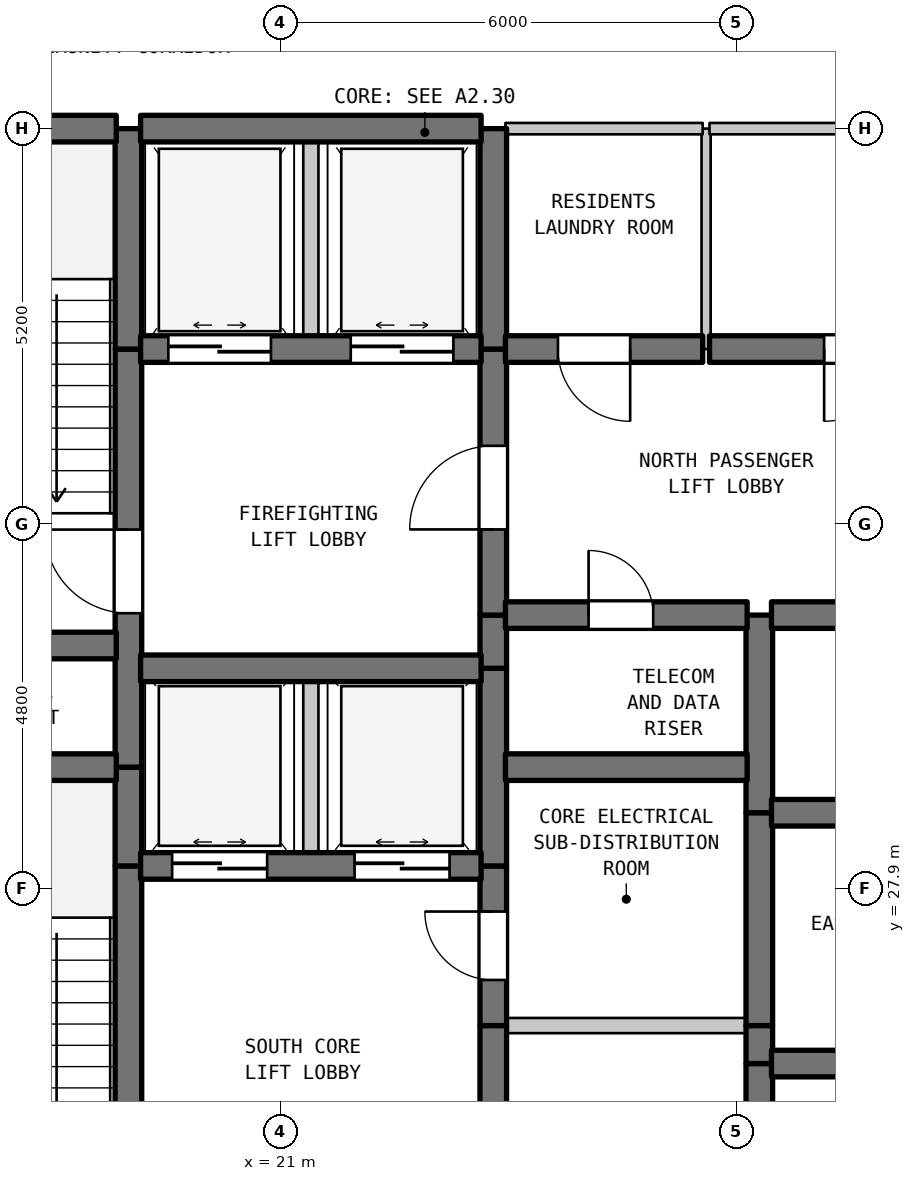
"""IFC4 building model, lengths in metres.
Left out: names, types, materials, properties, quantities, classifications, styles, units other than length and angle.
Written with IfcOpenShell. Run it as: python <this file> out.ifc"""

import sys

from ifc_helpers import new_model, si_unit, direction, frame, frame_2d, origin, place, context, subcontext, project, spatial, rectangle, extrude, element, fill, save


model = new_model("IFC4")
c1 = context("Model", 3, precision=1e-05, world=origin(), true_north=direction((0.0, 1.0)))
c2 = subcontext(c1, "Body", "Model", "MODEL_VIEW")
j1 = project(units=[si_unit("LENGTHUNIT", "METRE"), si_unit("PLANEANGLEUNIT", "RADIAN")], contexts=[c1])
p1 = place(None, origin())
s1 = spatial("IfcSite", under=j1, at=p1, CompositionType="ELEMENT")
p2 = place(p1, origin())
s2 = spatial("IfcBuilding", under=s1, at=p2, CompositionType="ELEMENT")
p3 = place(p2, frame((0.0, 0.0, 299.1)))
s3 = spatial("IfcBuildingStorey", under=s2, at=p3, CompositionType="ELEMENT", Elevation=299.1)
p4 = place(p3, frame((19.0, 22.7, 0.0), z_axis=(0.0, 0.0, 1.0), x_axis=(0.0, 1.0, 0.0)))
e1 = element("IfcWall", 1, at=p4, inside=s3, PredefinedType="SHEAR", context=c2, shape_type="SweptSolid", body=[
    extrude(rectangle(XDim=5.5, YDim=0.35, at=frame_2d((2.75, 0.0))), origin(), (0.0, 0.0, 1.0), 4.19),
])
p5 = place(p4, frame((0.631, 0.0, 0.0)))
e2 = element("IfcOpeningElement", 2, at=p5, cuts=e1, PredefinedType="OPENING", context=c2, shape_type="SweptSolid", body=[
    extrude(rectangle(XDim=1.1, YDim=2.15, at=frame_2d((0.55, 1.075))), frame((0.0, 0.185, 0.0), z_axis=(0.0, -1.0, 0.0), x_axis=(1.0, 0.0, 0.0)), (0.0, 0.0, 1.0), 0.37),
])
p6 = place(p3, frame((19.0, 28.2, 0.0), z_axis=(0.0, 0.0, 1.0), x_axis=(0.0, 1.0, 0.0)))
e3 = element("IfcWall", 3, at=p6, inside=s3, PredefinedType="SHEAR", context=c2, shape_type="SweptSolid", body=[
    extrude(rectangle(XDim=1.3, YDim=0.35, at=frame_2d((0.65, 0.0))), origin(), (0.0, 0.0, 1.0), 4.19),
])
p7 = place(p3, frame((19.0, 29.5, 0.0), z_axis=(0.0, 0.0, 1.0), x_axis=(0.0, 1.0, 0.0)))
e4 = element("IfcWall", 4, at=p7, inside=s3, PredefinedType="SHEAR", context=c2, shape_type="SweptSolid", body=[
    extrude(rectangle(XDim=5.5, YDim=0.35, at=frame_2d((2.75, 0.0))), origin(), (0.0, 0.0, 1.0), 4.19),
])
p8 = place(p7, frame((2.025, 0.0, 0.0)))
e5 = element("IfcOpeningElement", 5, at=p8, cuts=e4, PredefinedType="OPENING", context=c2, shape_type="SweptSolid", body=[
    extrude(rectangle(XDim=1.1, YDim=2.15, at=frame_2d((0.55, 1.075))), frame((0.0, 0.185, 0.0), z_axis=(0.0, -1.0, 0.0), x_axis=(1.0, 0.0, 0.0)), (0.0, 0.0, 1.0), 0.37),
])
p9 = place(p3, frame((19.0, 35.0, 0.0), z_axis=(0.0, 0.0, 1.0), x_axis=(0.0, 1.0, 0.0)))
e6 = element("IfcWall", 6, at=p9, inside=s3, PredefinedType="SHEAR", context=c2, shape_type="SweptSolid", body=[
    extrude(rectangle(XDim=2.9, YDim=0.35, at=frame_2d((1.45, 0.0))), origin(), (0.0, 0.0, 1.0), 4.19),
])
p10 = place(p3, frame((21.4, 28.2, 0.0), z_axis=(0.0, 0.0, 1.0), x_axis=(0.0, 1.0, 0.0)))
e7 = element("IfcWall", 7, at=p10, inside=s3, PredefinedType="STANDARD", context=c2, shape_type="SweptSolid", body=[
    extrude(rectangle(XDim=2.6, YDim=0.2, at=frame_2d((1.3, 0.0))), origin(), (0.0, 0.0, 1.0), 4.19),
])
p11 = place(p3, frame((21.4, 35.0, 0.0), z_axis=(0.0, 0.0, 1.0), x_axis=(0.0, 1.0, 0.0)))
e8 = element("IfcWall", 8, at=p11, inside=s3, PredefinedType="STANDARD", context=c2, shape_type="SweptSolid", body=[
    extrude(rectangle(XDim=2.9, YDim=0.2, at=frame_2d((1.45, 0.0))), origin(), (0.0, 0.0, 1.0), 4.19),
])
p12 = place(p3, frame((23.8, 22.7, 0.0), z_axis=(0.0, 0.0, 1.0), x_axis=(0.0, 1.0, 0.0)))
e9 = element("IfcWall", 9, at=p12, inside=s3, PredefinedType="SHEAR", context=c2, shape_type="SweptSolid", body=[
    extrude(rectangle(XDim=3.4, YDim=0.35, at=frame_2d((1.7, 0.0))), origin(), (0.0, 0.0, 1.0), 4.19),
])
p13 = place(p12, frame((1.25, 0.0, 0.0)))
e10 = element("IfcOpeningElement", 10, at=p13, cuts=e9, PredefinedType="OPENING", context=c2, shape_type="SweptSolid", body=[
    extrude(rectangle(XDim=0.9, YDim=2.15, at=frame_2d((0.45, 1.075))), frame((0.0, 0.185, 0.0), z_axis=(0.0, -1.0, 0.0), x_axis=(1.0, 0.0, 0.0)), (0.0, 0.0, 1.0), 0.37),
])
p14 = place(p3, frame((23.8, 26.1, 0.0), z_axis=(0.0, 0.0, 1.0), x_axis=(0.0, 1.0, 0.0)))
e11 = element("IfcWall", 11, at=p14, inside=s3, PredefinedType="SHEAR", context=c2, shape_type="SweptSolid", body=[
    extrude(rectangle(XDim=2.1, YDim=0.35, at=frame_2d((1.05, 0.0))), origin(), (0.0, 0.0, 1.0), 4.19),
])
p15 = place(p14, frame((0.6, 0.0, 0.0)))
e12 = element("IfcOpeningElement", 12, at=p15, cuts=e11, PredefinedType="OPENING", context=c2, shape_type="SweptSolid", body=[
    extrude(rectangle(XDim=0.9, YDim=2.15, at=frame_2d((0.45, 1.075))), frame((0.0, 0.185, 0.0), z_axis=(0.0, -1.0, 0.0), x_axis=(1.0, 0.0, 0.0)), (0.0, 0.0, 1.0), 0.37),
])
p16 = place(p3, frame((23.8, 28.2, 0.0), z_axis=(0.0, 0.0, 1.0), x_axis=(0.0, 1.0, 0.0)))
e13 = element("IfcWall", 13, at=p16, inside=s3, PredefinedType="SHEAR", context=c2, shape_type="SweptSolid", body=[
    extrude(rectangle(XDim=2.6, YDim=0.35, at=frame_2d((1.3, 0.0))), origin(), (0.0, 0.0, 1.0), 4.19),
])
p17 = place(p3, frame((23.8, 30.8, 0.0), z_axis=(0.0, 0.0, 1.0), x_axis=(0.0, 1.0, 0.0)))
e14 = element("IfcWall", 14, at=p17, inside=s3, PredefinedType="SHEAR", context=c2, shape_type="SweptSolid", body=[
    extrude(rectangle(XDim=0.7, YDim=0.35, at=frame_2d((0.35, 0.0))), origin(), (0.0, 0.0, 1.0), 4.19),
])
p18 = place(p3, frame((23.8, 31.5, 0.0), z_axis=(0.0, 0.0, 1.0), x_axis=(0.0, 1.0, 0.0)))
e15 = element("IfcWall", 15, at=p18, inside=s3, PredefinedType="SHEAR", context=c2, shape_type="SweptSolid", body=[
    extrude(rectangle(XDim=3.5, YDim=0.35, at=frame_2d((1.75, 0.0))), origin(), (0.0, 0.0, 1.0), 4.19),
])
p19 = place(p18, frame((1.127, 0.0, 0.0)))
e16 = element("IfcOpeningElement", 16, at=p19, cuts=e15, PredefinedType="OPENING", context=c2, shape_type="SweptSolid", body=[
    extrude(rectangle(XDim=1.1, YDim=2.15, at=frame_2d((0.55, 1.075))), frame((0.0, 0.185, 0.0), z_axis=(0.0, -1.0, 0.0), x_axis=(1.0, 0.0, 0.0)), (0.0, 0.0, 1.0), 0.37),
])
p20 = place(p3, frame((23.8, 35.0, 0.0), z_axis=(0.0, 0.0, 1.0), x_axis=(0.0, 1.0, 0.0)))
e17 = element("IfcWall", 17, at=p20, inside=s3, PredefinedType="SHEAR", context=c2, shape_type="SweptSolid", body=[
    extrude(rectangle(XDim=2.9, YDim=0.35, at=frame_2d((1.45, 0.0))), origin(), (0.0, 0.0, 1.0), 4.19),
])
p21 = place(p3, frame((26.6, 35.0, 0.0), z_axis=(0.0, 0.0, 1.0), x_axis=(0.0, 1.0, 0.0)))
e18 = element("IfcWall", 18, at=p21, inside=s3, PredefinedType="PARTITIONING", context=c2, shape_type="SweptSolid", body=[
    extrude(rectangle(XDim=2.9, YDim=0.12, at=frame_2d((1.45, 0.0))), origin(), (0.0, 0.0, 1.0), 4.19),
])
p22 = place(p3, frame((27.3, 22.7, 0.0), z_axis=(0.0, 0.0, 1.0), x_axis=(0.0, 1.0, 0.0)))
e19 = element("IfcWall", 19, at=p22, inside=s3, PredefinedType="SHEAR", context=c2, shape_type="SweptSolid", body=[
    extrude(rectangle(XDim=2.9, YDim=0.35, at=frame_2d((1.45, 0.0))), origin(), (0.0, 0.0, 1.0), 4.19),
])
p23 = place(p3, frame((27.3, 25.6, 0.0), z_axis=(0.0, 0.0, 1.0), x_axis=(0.0, 1.0, 0.0)))
e20 = element("IfcWall", 20, at=p23, inside=s3, PredefinedType="SHEAR", context=c2, shape_type="SweptSolid", body=[
    extrude(rectangle(XDim=0.5, YDim=0.35, at=frame_2d((0.25, 0.0))), origin(), (0.0, 0.0, 1.0), 4.19),
])
p24 = place(p3, frame((27.3, 26.1, 0.0), z_axis=(0.0, 0.0, 1.0), x_axis=(0.0, 1.0, 0.0)))
e21 = element("IfcWall", 21, at=p24, inside=s3, PredefinedType="SHEAR", context=c2, shape_type="SweptSolid", body=[
    extrude(rectangle(XDim=2.8, YDim=0.35, at=frame_2d((1.4, 0.0))), origin(), (0.0, 0.0, 1.0), 4.19),
])
p25 = place(p3, frame((27.3, 28.9, 0.0), z_axis=(0.0, 0.0, 1.0), x_axis=(0.0, 1.0, 0.0)))
e22 = element("IfcWall", 22, at=p25, inside=s3, PredefinedType="SHEAR", context=c2, shape_type="SweptSolid", body=[
    extrude(rectangle(XDim=2.6, YDim=0.35, at=frame_2d((1.3, 0.0))), origin(), (0.0, 0.0, 1.0), 4.19),
])
p26 = place(p3, frame((27.46, 25.6, 0.0), z_axis=(0.0, 0.0, 1.0), x_axis=(1.0, 0.0, 0.0)))
e23 = element("IfcWall", 23, at=p26, inside=s3, PredefinedType="SHEAR", context=c2, shape_type="SweptSolid", body=[
    extrude(rectangle(XDim=3.18, YDim=0.35, at=frame_2d((1.59, 0.0))), origin(), (0.0, 0.0, 1.0), 4.19),
])
p27 = place(p26, frame((1.115, 0.0, 0.0)))
e24 = element("IfcOpeningElement", 24, at=p27, cuts=e23, PredefinedType="OPENING", context=c2, shape_type="SweptSolid", body=[
    extrude(rectangle(XDim=0.95, YDim=2.15, at=frame_2d((0.475, 1.075))), frame((0.0, 0.185, 0.0), z_axis=(0.0, -1.0, 0.0), x_axis=(1.0, 0.0, 0.0)), (0.0, 0.0, 1.0), 0.37),
])
p28 = place(p3, frame((23.96, 26.1, 0.0), z_axis=(0.0, 0.0, 1.0), x_axis=(1.0, 0.0, 0.0)))
e25 = element("IfcWall", 25, at=p28, inside=s3, PredefinedType="STANDARD", context=c2, shape_type="SweptSolid", body=[
    extrude(rectangle(XDim=3.18, YDim=0.2, at=frame_2d((1.59, 0.0))), origin(), (0.0, 0.0, 1.0), 4.19),
])
p29 = place(p3, frame((19.16, 28.2, 0.0), z_axis=(0.0, 0.0, 1.0), x_axis=(1.0, 0.0, 0.0)))
e26 = element("IfcWall", 26, at=p29, inside=s3, PredefinedType="SHEAR", context=c2, shape_type="SweptSolid", body=[
    extrude(rectangle(XDim=4.48, YDim=0.35, at=frame_2d((2.24, 0.0))), origin(), (0.0, 0.0, 1.0), 4.19),
])
p30 = place(p29, frame((0.415, 0.0, 0.0)))
e27 = element("IfcOpeningElement", 27, at=p30, cuts=e26, PredefinedType="OPENING", context=c2, shape_type="SweptSolid", body=[
    extrude(rectangle(XDim=1.25, YDim=2.2, at=frame_2d((0.625, 1.1))), frame((0.0, 0.185, 0.0), z_axis=(0.0, -1.0, 0.0), x_axis=(1.0, 0.0, 0.0)), (0.0, 0.0, 1.0), 0.37),
])
p31 = place(p29, frame((2.815, 0.0, 0.0)))
e28 = element("IfcOpeningElement", 28, at=p31, cuts=e26, PredefinedType="OPENING", context=c2, shape_type="SweptSolid", body=[
    extrude(rectangle(XDim=1.25, YDim=2.2, at=frame_2d((0.625, 1.1))), frame((0.0, 0.185, 0.0), z_axis=(0.0, -1.0, 0.0), x_axis=(1.0, 0.0, 0.0)), (0.0, 0.0, 1.0), 0.37),
])
p32 = place(p3, frame((27.46, 28.9, 0.0), z_axis=(0.0, 0.0, 1.0), x_axis=(1.0, 0.0, 0.0)))
e29 = element("IfcWall", 29, at=p32, inside=s3, PredefinedType="SHEAR", context=c2, shape_type="SweptSolid", body=[
    extrude(rectangle(XDim=3.18, YDim=0.35, at=frame_2d((1.59, 0.0))), origin(), (0.0, 0.0, 1.0), 4.19),
])
p33 = place(p32, frame((1.115, 0.0, 0.0)))
e30 = element("IfcOpeningElement", 30, at=p33, cuts=e29, PredefinedType="OPENING", context=c2, shape_type="SweptSolid", body=[
    extrude(rectangle(XDim=0.95, YDim=2.15, at=frame_2d((0.475, 1.075))), frame((0.0, 0.185, 0.0), z_axis=(0.0, -1.0, 0.0), x_axis=(1.0, 0.0, 0.0)), (0.0, 0.0, 1.0), 0.37),
])
p34 = place(p3, frame((15.16, 29.5, 0.0), z_axis=(0.0, 0.0, 1.0), x_axis=(1.0, 0.0, 0.0)))
e31 = element("IfcWall", 31, at=p34, inside=s3, PredefinedType="SHEAR", context=c2, shape_type="SweptSolid", body=[
    extrude(rectangle(XDim=3.68, YDim=0.35, at=frame_2d((1.84, 0.0))), origin(), (0.0, 0.0, 1.0), 4.19),
])
p35 = place(p3, frame((23.96, 29.5, 0.0), z_axis=(0.0, 0.0, 1.0), x_axis=(1.0, 0.0, 0.0)))
e32 = element("IfcWall", 32, at=p35, inside=s3, PredefinedType="SHEAR", context=c2, shape_type="SweptSolid", body=[
    extrude(rectangle(XDim=3.18, YDim=0.35, at=frame_2d((1.59, 0.0))), origin(), (0.0, 0.0, 1.0), 4.19),
])
p36 = place(p3, frame((19.16, 30.8, 0.0), z_axis=(0.0, 0.0, 1.0), x_axis=(1.0, 0.0, 0.0)))
e33 = element("IfcWall", 33, at=p36, inside=s3, PredefinedType="SHEAR", context=c2, shape_type="SweptSolid", body=[
    extrude(rectangle(XDim=4.48, YDim=0.35, at=frame_2d((2.24, 0.0))), origin(), (0.0, 0.0, 1.0), 4.19),
])
p37 = place(p3, frame((15.16, 31.1, 0.0), z_axis=(0.0, 0.0, 1.0), x_axis=(1.0, 0.0, 0.0)))
e34 = element("IfcWall", 34, at=p37, inside=s3, PredefinedType="SHEAR", context=c2, shape_type="SweptSolid", body=[
    extrude(rectangle(XDim=3.68, YDim=0.35, at=frame_2d((1.84, 0.0))), origin(), (0.0, 0.0, 1.0), 4.19),
])
p38 = place(p3, frame((23.96, 31.5, 0.0), z_axis=(0.0, 0.0, 1.0), x_axis=(1.0, 0.0, 0.0)))
e35 = element("IfcWall", 35, at=p38, inside=s3, PredefinedType="SHEAR", context=c2, shape_type="SweptSolid", body=[
    extrude(rectangle(XDim=3.18, YDim=0.35, at=frame_2d((1.59, 0.0))), origin(), (0.0, 0.0, 1.0), 4.19),
])
p39 = place(p38, frame((1.094, 0.0, 0.0)))
e36 = element("IfcOpeningElement", 36, at=p39, cuts=e35, PredefinedType="OPENING", context=c2, shape_type="SweptSolid", body=[
    extrude(rectangle(XDim=0.85, YDim=2.1, at=frame_2d((0.425, 1.05))), frame((0.0, 0.185, 0.0), z_axis=(0.0, -1.0, 0.0), x_axis=(1.0, 0.0, 0.0)), (0.0, 0.0, 1.0), 0.37),
])
p40 = place(p3, frame((27.46, 31.5, 0.0), z_axis=(0.0, 0.0, 1.0), x_axis=(1.0, 0.0, 0.0)))
e37 = element("IfcWall", 37, at=p40, inside=s3, PredefinedType="SHEAR", context=c2, shape_type="SweptSolid", body=[
    extrude(rectangle(XDim=3.18, YDim=0.35, at=frame_2d((1.59, 0.0))), origin(), (0.0, 0.0, 1.0), 4.19),
])
p41 = place(p3, frame((19.16, 35.0, 0.0), z_axis=(0.0, 0.0, 1.0), x_axis=(1.0, 0.0, 0.0)))
e38 = element("IfcWall", 38, at=p41, inside=s3, PredefinedType="SHEAR", context=c2, shape_type="SweptSolid", body=[
    extrude(rectangle(XDim=4.48, YDim=0.35, at=frame_2d((2.24, 0.0))), origin(), (0.0, 0.0, 1.0), 4.19),
])
p42 = place(p41, frame((0.365, 0.0, 0.0)))
e39 = element("IfcOpeningElement", 39, at=p42, cuts=e38, PredefinedType="OPENING", context=c2, shape_type="SweptSolid", body=[
    extrude(rectangle(XDim=1.35, YDim=2.2, at=frame_2d((0.675, 1.1))), frame((0.0, 0.185, 0.0), z_axis=(0.0, -1.0, 0.0), x_axis=(1.0, 0.0, 0.0)), (0.0, 0.0, 1.0), 0.37),
])
p43 = place(p41, frame((2.765, 0.0, 0.0)))
e40 = element("IfcOpeningElement", 40, at=p43, cuts=e38, PredefinedType="OPENING", context=c2, shape_type="SweptSolid", body=[
    extrude(rectangle(XDim=1.35, YDim=2.2, at=frame_2d((0.675, 1.1))), frame((0.0, 0.185, 0.0), z_axis=(0.0, -1.0, 0.0), x_axis=(1.0, 0.0, 0.0)), (0.0, 0.0, 1.0), 0.37),
])
p44 = place(p3, frame((23.96, 35.0, 0.0), z_axis=(0.0, 0.0, 1.0), x_axis=(1.0, 0.0, 0.0)))
e41 = element("IfcWall", 41, at=p44, inside=s3, PredefinedType="SHEAR", context=c2, shape_type="SweptSolid", body=[
    extrude(rectangle(XDim=2.595, YDim=0.35, at=frame_2d((1.297, 0.0))), origin(), (0.0, 0.0, 1.0), 4.19),
])
p45 = place(p44, frame((0.691, 0.0, 0.0)))
e42 = element("IfcOpeningElement", 42, at=p45, cuts=e41, PredefinedType="OPENING", context=c2, shape_type="SweptSolid", body=[
    extrude(rectangle(XDim=0.95, YDim=2.15, at=frame_2d((0.475, 1.075))), frame((0.0, 0.185, 0.0), z_axis=(0.0, -1.0, 0.0), x_axis=(1.0, 0.0, 0.0)), (0.0, 0.0, 1.0), 0.37),
])
p46 = place(p3, frame((26.645, 35.0, 0.0), z_axis=(0.0, 0.0, 1.0), x_axis=(1.0, 0.0, 0.0)))
e43 = element("IfcWall", 43, at=p46, inside=s3, PredefinedType="SHEAR", context=c2, shape_type="SweptSolid", body=[
    extrude(rectangle(XDim=3.995, YDim=0.35, at=frame_2d((1.998, 0.0))), origin(), (0.0, 0.0, 1.0), 4.19),
])
p47 = place(p46, frame((1.508, 0.0, 0.0)))
e44 = element("IfcOpeningElement", 44, at=p47, cuts=e43, PredefinedType="OPENING", context=c2, shape_type="SweptSolid", body=[
    extrude(rectangle(XDim=0.95, YDim=2.15, at=frame_2d((0.475, 1.075))), frame((0.0, 0.185, 0.0), z_axis=(0.0, -1.0, 0.0), x_axis=(1.0, 0.0, 0.0)), (0.0, 0.0, 1.0), 0.37),
])
p48 = place(p3, frame((15.16, 37.9, 0.0), z_axis=(0.0, 0.0, 1.0), x_axis=(1.0, 0.0, 0.0)))
e45 = element("IfcWall", 45, at=p48, inside=s3, PredefinedType="SHEAR", context=c2, shape_type="SweptSolid", body=[
    extrude(rectangle(XDim=3.68, YDim=0.35, at=frame_2d((1.84, 0.0))), origin(), (0.0, 0.0, 1.0), 4.19),
])
p49 = place(p3, frame((19.16, 37.9, 0.0), z_axis=(0.0, 0.0, 1.0), x_axis=(1.0, 0.0, 0.0)))
e46 = element("IfcWall", 46, at=p49, inside=s3, PredefinedType="SHEAR", context=c2, shape_type="SweptSolid", body=[
    extrude(rectangle(XDim=4.48, YDim=0.35, at=frame_2d((2.24, 0.0))), origin(), (0.0, 0.0, 1.0), 4.19),
])
p50 = place(p3, frame((23.96, 37.9, 0.0), z_axis=(0.0, 0.0, 1.0), x_axis=(1.0, 0.0, 0.0)))
e47 = element("IfcWall", 47, at=p50, inside=s3, PredefinedType="STANDARD", context=c2, shape_type="SweptSolid", body=[
    extrude(rectangle(XDim=2.595, YDim=0.15, at=frame_2d((1.297, 0.0))), origin(), (0.0, 0.0, 1.0), 3.69),
])
p51 = place(p3, frame((26.645, 37.9, 0.0), z_axis=(0.0, 0.0, 1.0), x_axis=(1.0, 0.0, 0.0)))
e48 = element("IfcWall", 48, at=p51, inside=s3, PredefinedType="STANDARD", context=c2, shape_type="SweptSolid", body=[
    extrude(rectangle(XDim=4.095, YDim=0.15, at=frame_2d((2.047, 0.0))), origin(), (0.0, 0.0, 1.0), 3.69),
])
p52 = place(p8, origin())
e49 = element("IfcDoor", 49, at=p52, inside=s3, OperationType="SINGLE_SWING_RIGHT", PredefinedType="DOOR", context=c2, shape_type="SweptSolid", body=[
    extrude(rectangle(XDim=1.1, YDim=2.15, at=frame_2d((0.55, 1.075))), frame((0.0, 0.025, 0.0), z_axis=(0.0, -1.0, 0.0), x_axis=(1.0, 0.0, 0.0)), (0.0, 0.0, 1.0), 0.05),
])
fill(e5, e49)
p53 = place(p15, origin())
e50 = element("IfcDoor", 50, at=p53, inside=s3, OperationType="SINGLE_SWING_RIGHT", PredefinedType="DOOR", context=c2, shape_type="SweptSolid", body=[
    extrude(rectangle(XDim=0.9, YDim=2.15, at=frame_2d((0.45, 1.075))), frame((0.0, 0.025, 0.0), z_axis=(0.0, -1.0, 0.0), x_axis=(1.0, 0.0, 0.0)), (0.0, 0.0, 1.0), 0.05),
])
fill(e12, e50)
p54 = place(p19, origin())
e51 = element("IfcDoor", 51, at=p54, inside=s3, OperationType="SINGLE_SWING_LEFT", PredefinedType="DOOR", context=c2, shape_type="SweptSolid", body=[
    extrude(rectangle(XDim=1.1, YDim=2.15, at=frame_2d((0.55, 1.075))), frame((0.0, 0.025, 0.0), z_axis=(0.0, -1.0, 0.0), x_axis=(1.0, 0.0, 0.0)), (0.0, 0.0, 1.0), 0.05),
])
fill(e16, e51)
p55 = place(p30, origin())
e52 = element("IfcDoor", 52, at=p55, inside=s3, OperationType="DOUBLE_DOOR_SLIDING", PredefinedType="DOOR", context=c2, shape_type="SweptSolid", body=[
    extrude(rectangle(XDim=1.25, YDim=2.2, at=frame_2d((0.625, 1.1))), frame((0.0, 0.025, 0.0), z_axis=(0.0, -1.0, 0.0), x_axis=(1.0, 0.0, 0.0)), (0.0, 0.0, 1.0), 0.05),
])
fill(e27, e52)
p56 = place(p31, origin())
e53 = element("IfcDoor", 53, at=p56, inside=s3, OperationType="DOUBLE_DOOR_SLIDING", PredefinedType="DOOR", context=c2, shape_type="SweptSolid", body=[
    extrude(rectangle(XDim=1.25, YDim=2.2, at=frame_2d((0.625, 1.1))), frame((0.0, 0.025, 0.0), z_axis=(0.0, -1.0, 0.0), x_axis=(1.0, 0.0, 0.0)), (0.0, 0.0, 1.0), 0.05),
])
fill(e28, e53)
p57 = place(p39, origin())
e54 = element("IfcDoor", 54, at=p57, inside=s3, OperationType="SINGLE_SWING_LEFT", PredefinedType="DOOR", context=c2, shape_type="SweptSolid", body=[
    extrude(rectangle(XDim=0.85, YDim=2.1, at=frame_2d((0.425, 1.05))), frame((0.0, 0.025, 0.0), z_axis=(0.0, -1.0, 0.0), x_axis=(1.0, 0.0, 0.0)), (0.0, 0.0, 1.0), 0.05),
])
fill(e36, e54)
p58 = place(p42, origin())
e55 = element("IfcDoor", 55, at=p58, inside=s3, OperationType="DOUBLE_DOOR_SLIDING", PredefinedType="DOOR", context=c2, shape_type="SweptSolid", body=[
    extrude(rectangle(XDim=1.35, YDim=2.2, at=frame_2d((0.675, 1.1))), frame((0.0, 0.025, 0.0), z_axis=(0.0, -1.0, 0.0), x_axis=(1.0, 0.0, 0.0)), (0.0, 0.0, 1.0), 0.05),
])
fill(e39, e55)
p59 = place(p43, origin())
e56 = element("IfcDoor", 56, at=p59, inside=s3, OperationType="DOUBLE_DOOR_SLIDING", PredefinedType="DOOR", context=c2, shape_type="SweptSolid", body=[
    extrude(rectangle(XDim=1.35, YDim=2.2, at=frame_2d((0.675, 1.1))), frame((0.0, 0.025, 0.0), z_axis=(0.0, -1.0, 0.0), x_axis=(1.0, 0.0, 0.0)), (0.0, 0.0, 1.0), 0.05),
])
fill(e40, e56)
p60 = place(p45, frame((0.95, 0.0, 0.0), z_axis=(0.0, 0.0, 1.0), x_axis=(-1.0, 0.0, 0.0)))
e57 = element("IfcDoor", 57, at=p60, inside=s3, OperationType="SINGLE_SWING_RIGHT", PredefinedType="DOOR", context=c2, shape_type="SweptSolid", body=[
    extrude(rectangle(XDim=0.95, YDim=2.15, at=frame_2d((0.475, 1.075))), frame((0.0, 0.025, 0.0), z_axis=(0.0, -1.0, 0.0), x_axis=(1.0, 0.0, 0.0)), (0.0, 0.0, 1.0), 0.05),
])
fill(e42, e57)
p61 = place(p47, frame((0.95, 0.0, 0.0), z_axis=(0.0, 0.0, 1.0), x_axis=(-1.0, 0.0, 0.0)))
e58 = element("IfcDoor", 58, at=p61, inside=s3, OperationType="SINGLE_SWING_LEFT", PredefinedType="DOOR", context=c2, shape_type="SweptSolid", body=[
    extrude(rectangle(XDim=0.95, YDim=2.15, at=frame_2d((0.475, 1.075))), frame((0.0, 0.025, 0.0), z_axis=(0.0, -1.0, 0.0), x_axis=(1.0, 0.0, 0.0)), (0.0, 0.0, 1.0), 0.05),
])
fill(e44, e58)
save(model, sys.argv[1])
